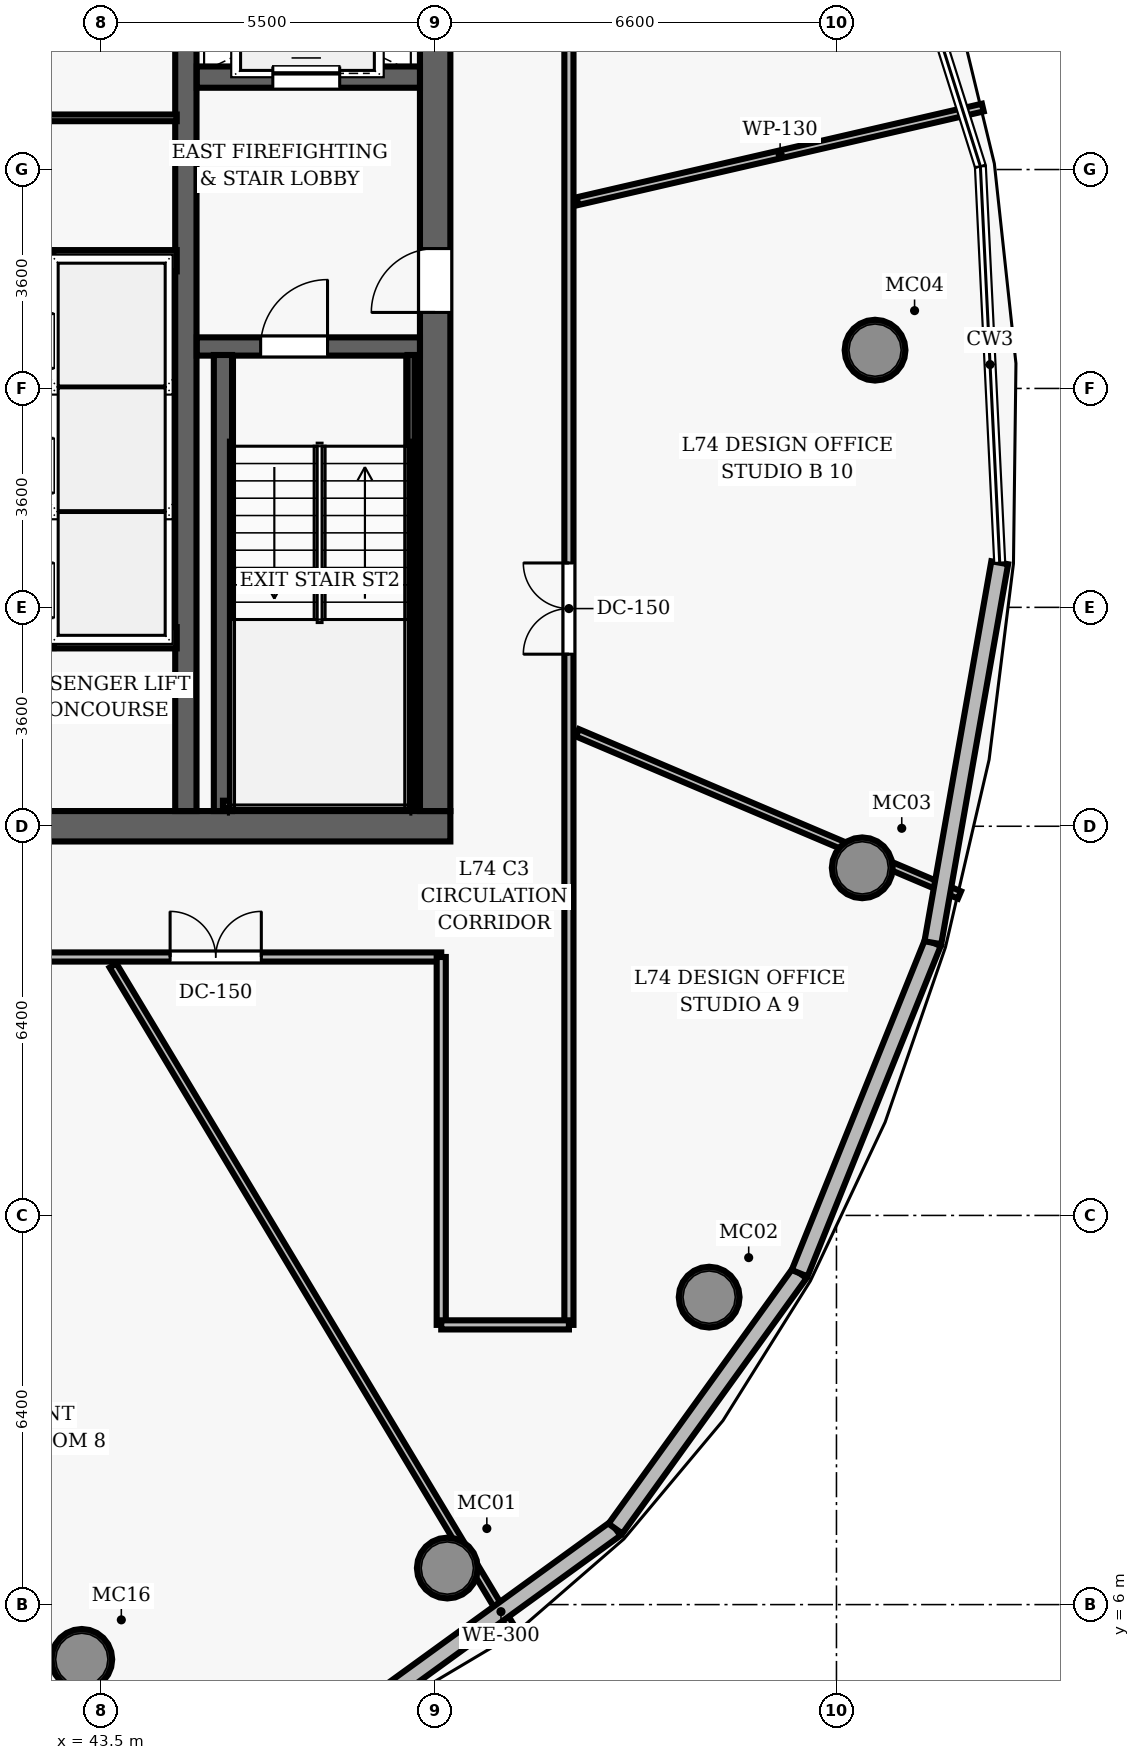
"""IFC4 building model, lengths in metres.
Left out: names, types, materials, properties, quantities, classifications, styles, units other than length and angle.
Written with IfcOpenShell. Run it as: python <this file> out.ifc"""

import sys

from ifc_helpers import new_model, si_unit, direction, frame, frame_2d, origin, origin_2d, place, context, subcontext, project, spatial, rectangle, hollow_circle, extrude, element, fill, save


model = new_model("IFC4")
c1 = context("Model", 3, precision=1e-05, world=origin(), true_north=direction((0.0, 1.0)))
c2 = subcontext(c1, "Body", "Model", "MODEL_VIEW")
j1 = project(units=[si_unit("LENGTHUNIT", "METRE"), si_unit("PLANEANGLEUNIT", "RADIAN")], contexts=[c1])
p1 = place(None, origin())
s1 = spatial("IfcSite", under=j1, at=p1, CompositionType="ELEMENT")
p2 = place(p1, origin())
s2 = spatial("IfcBuilding", under=s1, at=p2, CompositionType="ELEMENT")
p3 = place(p2, frame((0.0, 0.0, 292.1)))
s3 = spatial("IfcBuildingStorey", under=s2, at=p3, CompositionType="ELEMENT", Elevation=292.1)
p4 = place(p3, frame((26.75, 18.8, 0.0), z_axis=(0.0, 0.0, 1.0), x_axis=(1.0, 0.0, 0.0)))
e1 = element("IfcWall", 1, at=p4, inside=s3, PredefinedType="SHEAR", context=c2, shape_type="SweptSolid", body=[
    extrude(rectangle(XDim=22.5, YDim=0.5, at=frame_2d((11.25, 0.0))), origin(), (0.0, 0.0, 1.0), 3.85),
])
p5 = place(p4, frame((14.47, 0.0, 0.0)))
e2 = element("IfcOpeningElement", 2, at=p5, cuts=e1, PredefinedType="OPENING", context=c2, shape_type="SweptSolid", body=[
    extrude(rectangle(XDim=1.05, YDim=2.15, at=frame_2d((0.525, 1.075))), frame((0.0, 0.26, 0.0), z_axis=(0.0, -1.0, 0.0), x_axis=(1.0, 0.0, 0.0)), (0.0, 0.0, 1.0), 0.52),
])
p6 = place(p3, frame((49.0, 19.05, 0.0), z_axis=(0.0, 0.0, 1.0), x_axis=(0.0, 1.0, 0.0)))
e3 = element("IfcWall", 3, at=p6, inside=s3, PredefinedType="SHEAR", context=c2, shape_type="SweptSolid", body=[
    extrude(rectangle(XDim=13.9, YDim=0.5, at=frame_2d((6.95, 0.0))), origin(), (0.0, 0.0, 1.0), 3.85),
])
p7 = place(p6, frame((8.2, 0.0, 0.0)))
e4 = element("IfcOpeningElement", 4, at=p7, cuts=e3, PredefinedType="OPENING", context=c2, shape_type="SweptSolid", body=[
    extrude(rectangle(XDim=1.05, YDim=2.15, at=frame_2d((0.525, 1.075))), frame((0.0, 0.26, 0.0), z_axis=(0.0, -1.0, 0.0), x_axis=(1.0, 0.0, 0.0)), (0.0, 0.0, 1.0), 0.52),
])
p8 = place(p3, frame((44.9, 19.05, 0.0), z_axis=(0.0, 0.0, 1.0), x_axis=(0.0, 1.0, 0.0)))
e5 = element("IfcWall", 5, at=p8, inside=s3, PredefinedType="SHEAR", context=c2, shape_type="SweptSolid", body=[
    extrude(rectangle(XDim=13.9, YDim=0.35, at=frame_2d((6.95, 0.0))), origin(), (0.0, 0.0, 1.0), 3.85),
])
for number, where, z_axis, x_axis in (
    (6, (49.2, 6.601, 0.0), (0.0, 0.0, 1.0), (1.0, 0.0, 0.0)),
    (7, (53.506, 11.056, 0.0), (0.0, 0.0, 1.0), (1.0, 0.0, 0.0)),
    (8, (56.024, 18.116, 0.0), (0.0, 0.0, 1.0), (1.0, 0.0, 0.0)),
    (9, (56.235, 26.629, 0.0), (0.0, 0.0, 1.0), (1.0, 0.0, 0.0)),
    (10, (43.188, 5.099, 0.0), (0.0, 0.0, 1.0), (1.0, 0.0, 0.0)),
):
    element("IfcColumn", number, at=place(p3, frame(where, z_axis=z_axis, x_axis=x_axis)), inside=s3, PredefinedType="COLUMN", context=c2, shape_type="SweptSolid", body=[
        extrude(hollow_circle(Radius=0.5, WallThickness=0.045, at=origin_2d()), origin(), (0.0, 0.0, 1.0), 3.85),
    ])
p9 = place(p3, frame((45.08, 26.69, 0.0), z_axis=(0.0, 0.0, 1.0), x_axis=(1.0, 0.0, 0.0)))
e11 = element("IfcWall", 11, at=p9, inside=s3, PredefinedType="SHEAR", context=c2, shape_type="SweptSolid", body=[
    extrude(rectangle(XDim=3.67, YDim=0.3, at=frame_2d((1.835, 0.0))), origin(), (0.0, 0.0, 1.0), 3.85),
])
p10 = place(p9, frame((1.05, 0.0, 0.0)))
e12 = element("IfcOpeningElement", 12, at=p10, cuts=e11, PredefinedType="OPENING", context=c2, shape_type="SweptSolid", body=[
    extrude(rectangle(XDim=1.1, YDim=2.15, at=frame_2d((0.55, 1.075))), frame((0.0, 0.16, 0.0), z_axis=(0.0, -1.0, 0.0), x_axis=(1.0, 0.0, 0.0)), (0.0, 0.0, 1.0), 0.32),
])
p11 = place(p3, frame((45.51, 19.05, 0.0), z_axis=(0.0, 0.0, 1.0), x_axis=(0.0, 1.0, 0.0)))
e13 = element("IfcWall", 13, at=p11, inside=s3, PredefinedType="SHEAR", context=c2, shape_type="SweptSolid", body=[
    extrude(rectangle(XDim=7.5, YDim=0.3, at=frame_2d((3.75, 0.0))), origin(), (0.0, 0.0, 1.0), 3.85),
])
p12 = place(p3, frame((48.605, 19.1, 0.0), z_axis=(0.0, 0.0, 1.0), x_axis=(0.0, 1.0, 0.0)))
e14 = element("IfcWall", 14, at=p12, inside=s3, PredefinedType="SHEAR", context=c2, shape_type="SweptSolid", body=[
    extrude(rectangle(XDim=7.45, YDim=0.12, at=frame_2d((3.725, 0.0))), origin(), (0.0, 0.0, 1.0), 3.85),
])
p13 = place(p3, frame((45.51, 19.16, 0.0), z_axis=(0.0, 0.0, 1.0), x_axis=(1.0, 0.0, 0.0)))
e15 = element("IfcWall", 15, at=p13, inside=s3, PredefinedType="SHEAR", context=c2, shape_type="SweptSolid", body=[
    extrude(rectangle(XDim=3.095, YDim=0.12, at=frame_2d((1.547, 0.0))), origin(), (0.0, 0.0, 1.0), 3.85),
])
p14 = place(p3, frame((45.08, 31.12, 0.0), z_axis=(0.0, 0.0, 1.0), x_axis=(1.0, 0.0, 0.0)))
e16 = element("IfcWall", 16, at=p14, inside=s3, PredefinedType="SHEAR", context=c2, shape_type="SweptSolid", body=[
    extrude(rectangle(XDim=3.67, YDim=0.35, at=frame_2d((1.835, 0.0))), origin(), (0.0, 0.0, 1.0), 3.04),
])
p15 = place(p14, frame((1.25, 0.0, 0.0)))
e17 = element("IfcOpeningElement", 17, at=p15, cuts=e16, PredefinedType="OPENING", context=c2, shape_type="SweptSolid", body=[
    extrude(rectangle(XDim=1.1, YDim=2.15, at=frame_2d((0.55, 1.075))), frame((0.0, 0.185, 0.0), z_axis=(0.0, -1.0, 0.0), x_axis=(1.0, 0.0, 0.0)), (0.0, 0.0, 1.0), 0.37),
])
p16 = place(p3, frame((42.55, 21.73, 0.0), z_axis=(0.0, 0.0, 1.0), x_axis=(0.0, 1.0, 0.0)))
e18 = element("IfcWall", 18, at=p16, inside=s3, PredefinedType="SHEAR", context=c2, shape_type="SweptSolid", body=[
    extrude(rectangle(XDim=6.54, YDim=0.35, at=frame_2d((3.27, 0.0))), origin(), (0.0, 0.0, 1.0), 3.04),
])
p17 = place(p16, frame((0.5, 0.0, 0.0)))
e19 = element("IfcOpeningElement", 19, at=p17, cuts=e18, PredefinedType="OPENING", context=c2, shape_type="SweptSolid", body=[
    extrude(rectangle(XDim=0.9, YDim=2.15, at=frame_2d((0.45, 1.075))), frame((0.0, 0.185, 0.0), z_axis=(0.0, -1.0, 0.0), x_axis=(1.0, 0.0, 0.0)), (0.0, 0.0, 1.0), 0.37),
])
p18 = place(p16, frame((2.55, 0.0, 0.0)))
e20 = element("IfcOpeningElement", 20, at=p18, cuts=e18, PredefinedType="OPENING", context=c2, shape_type="SweptSolid", body=[
    extrude(rectangle(XDim=0.9, YDim=2.15, at=frame_2d((0.45, 1.075))), frame((0.0, 0.185, 0.0), z_axis=(0.0, -1.0, 0.0), x_axis=(1.0, 0.0, 0.0)), (0.0, 0.0, 1.0), 0.37),
])
p19 = place(p16, frame((4.6, 0.0, 0.0)))
e21 = element("IfcOpeningElement", 21, at=p19, cuts=e18, PredefinedType="OPENING", context=c2, shape_type="SweptSolid", body=[
    extrude(rectangle(XDim=0.9, YDim=2.15, at=frame_2d((0.45, 1.075))), frame((0.0, 0.185, 0.0), z_axis=(0.0, -1.0, 0.0), x_axis=(1.0, 0.0, 0.0)), (0.0, 0.0, 1.0), 0.37),
])
for number, where, z_axis, x_axis in (
    (22, (42.72, 21.9, 0.0), (0.0, 0.0, 1.0), (1.0, 0.0, 0.0)),
    (23, (42.72, 28.1, 0.0), (0.0, 0.0, 1.0), (1.0, 0.0, 0.0)),
):
    element("IfcWall", number, at=place(p3, frame(where, z_axis=z_axis, x_axis=x_axis)), inside=s3, PredefinedType="SHEAR", context=c2, shape_type="SweptSolid", body=[
        extrude(rectangle(XDim=2.03, YDim=0.35, at=frame_2d((1.015, 0.0))), origin(), (0.0, 0.0, 1.0), 3.04),
    ])
p20 = place(p3, frame((42.55, 30.45, 0.0), z_axis=(0.0, 0.0, 1.0), x_axis=(1.0, 0.0, 0.0)))
e24 = element("IfcWall", 24, at=p20, inside=s3, PredefinedType="PARTITIONING", context=c2, shape_type="SweptSolid", body=[
    extrude(rectangle(XDim=2.2, YDim=0.11, at=frame_2d((1.1, 0.0))), origin(), (0.0, 0.0, 1.0), 3.04),
])
p21 = place(p3, frame((26.9, 16.65, 0.0), z_axis=(0.0, 0.0, 1.0), x_axis=(1.0, 0.0, 0.0)))
e25 = element("IfcWall", 25, at=p21, inside=s3, PredefinedType="PARTITIONING", context=c2, shape_type="SweptSolid", body=[
    extrude(rectangle(XDim=22.2, YDim=0.15, at=frame_2d((11.1, 0.0))), origin(), (0.0, 0.0, 1.0), 3.04),
])
p22 = place(p21, frame((7.813, 0.0, 0.0)))
e26 = element("IfcOpeningElement", 26, at=p22, cuts=e25, PredefinedType="OPENING", context=c2, shape_type="SweptSolid", body=[
    extrude(rectangle(XDim=1.5, YDim=2.2, at=frame_2d((0.75, 1.1))), frame((0.0, 0.085, 0.0), z_axis=(0.0, -1.0, 0.0), x_axis=(1.0, 0.0, 0.0)), (0.0, 0.0, 1.0), 0.17),
])
p23 = place(p21, frame((14.125, 0.0, 0.0)))
e27 = element("IfcOpeningElement", 27, at=p23, cuts=e25, PredefinedType="OPENING", context=c2, shape_type="SweptSolid", body=[
    extrude(rectangle(XDim=0.95, YDim=2.15, at=frame_2d((0.475, 1.075))), frame((0.0, 0.085, 0.0), z_axis=(0.0, -1.0, 0.0), x_axis=(1.0, 0.0, 0.0)), (0.0, 0.0, 1.0), 0.17),
])
p24 = place(p21, frame((17.741, 0.0, 0.0)))
e28 = element("IfcOpeningElement", 28, at=p24, cuts=e25, PredefinedType="OPENING", context=c2, shape_type="SweptSolid", body=[
    extrude(rectangle(XDim=1.5, YDim=2.2, at=frame_2d((0.75, 1.1))), frame((0.0, 0.085, 0.0), z_axis=(0.0, -1.0, 0.0), x_axis=(1.0, 0.0, 0.0)), (0.0, 0.0, 1.0), 0.17),
])
p25 = place(p3, frame((51.2, 10.6, 0.0), z_axis=(0.0, 0.0, 1.0), x_axis=(0.0, 1.0, 0.0)))
e29 = element("IfcWall", 29, at=p25, inside=s3, PredefinedType="PARTITIONING", context=c2, shape_type="SweptSolid", body=[
    extrude(rectangle(XDim=30.8, YDim=0.15, at=frame_2d((15.4, 0.0))), origin(), (0.0, 0.0, 1.0), 3.04),
])
p26 = place(p25, frame((26.895, 0.0, 0.0)))
e30 = element("IfcOpeningElement", 30, at=p26, cuts=e29, PredefinedType="OPENING", context=c2, shape_type="SweptSolid", body=[
    extrude(rectangle(XDim=1.5, YDim=2.2, at=frame_2d((0.75, 1.1))), frame((0.0, 0.085, 0.0), z_axis=(0.0, -1.0, 0.0), x_axis=(1.0, 0.0, 0.0)), (0.0, 0.0, 1.0), 0.17),
])
p27 = place(p25, frame((11.03, 0.0, 0.0)))
e31 = element("IfcOpeningElement", 31, at=p27, cuts=e29, PredefinedType="OPENING", context=c2, shape_type="SweptSolid", body=[
    extrude(rectangle(XDim=1.5, YDim=2.2, at=frame_2d((0.75, 1.1))), frame((0.0, 0.085, 0.0), z_axis=(0.0, -1.0, 0.0), x_axis=(1.0, 0.0, 0.0)), (0.0, 0.0, 1.0), 0.17),
])
p28 = place(p3, frame((49.1, 10.6, 0.0), z_axis=(0.0, 0.0, 1.0), x_axis=(0.0, 1.0, 0.0)))
e32 = element("IfcWall", 32, at=p28, inside=s3, PredefinedType="PARTITIONING", context=c2, shape_type="SweptSolid", body=[
    extrude(rectangle(XDim=6.05, YDim=0.15, at=frame_2d((3.025, 0.0))), origin(), (0.0, 0.0, 1.0), 3.04),
])
p29 = place(p3, frame((49.1, 10.6, 0.0), z_axis=(0.0, 0.0, 1.0), x_axis=(1.0, 0.0, 0.0)))
e33 = element("IfcWall", 33, at=p29, inside=s3, PredefinedType="PARTITIONING", context=c2, shape_type="SweptSolid", body=[
    extrude(rectangle(XDim=2.1, YDim=0.15, at=frame_2d((1.05, 0.0))), origin(), (0.0, 0.0, 1.0), 3.04),
])
p30 = place(p3, frame((51.34, 29.08, 0.0), z_axis=(0.0, 0.0, 1.0), x_axis=(0.974374354779, 0.22493247153, 0.0)))
e34 = element("IfcWall", 34, at=p30, inside=s3, PredefinedType="PARTITIONING", context=c2, shape_type="SweptSolid", body=[
    extrude(rectangle(XDim=6.842, YDim=0.13, at=frame_2d((3.421, 0.0))), origin(), (0.0, 0.0, 1.0), 3.04),
])
p31 = place(p3, frame((43.702, 16.51, 0.0), z_axis=(0.0, 0.0, 1.0), x_axis=(0.515037616381, -0.857167576214, 0.0)))
e35 = element("IfcWall", 35, at=p31, inside=s3, PredefinedType="PARTITIONING", context=c2, shape_type="SweptSolid", body=[
    extrude(rectangle(XDim=12.852, YDim=0.13, at=frame_2d((6.426, 0.0))), origin(), (0.0, 0.0, 1.0), 3.04),
])
p32 = place(p3, frame((51.34, 20.337, 0.0), z_axis=(0.0, 0.0, 1.0), x_axis=(0.92050850524, -0.390722525305, 0.0)))
e36 = element("IfcWall", 36, at=p32, inside=s3, PredefinedType="PARTITIONING", context=c2, shape_type="SweptSolid", body=[
    extrude(rectangle(XDim=6.826, YDim=0.13, at=frame_2d((3.413, 0.0))), origin(), (0.0, 0.0, 1.0), 3.04),
])
p33 = place(p3, frame((51.965, 7.249, 0.0), z_axis=(0.0, 0.0, 1.0), x_axis=(-0.809566158973, -0.587028648573, 0.0)))
e37 = element("IfcWall", 37, at=p33, inside=s3, PredefinedType="SOLIDWALL", context=c2, shape_type="SweptSolid", body=[
    extrude(rectangle(XDim=4.65, YDim=0.28, at=frame_2d((2.325, 0.0))), origin(), (0.0, 0.0, 1.0), 3.625),
])
p34 = place(p3, frame((54.994, 11.45, 0.0), z_axis=(0.0, 0.0, 1.0), x_axis=(-0.584893181171, -0.811110329498, 0.0)))
e38 = element("IfcWall", 38, at=p34, inside=s3, PredefinedType="SOLIDWALL", context=c2, shape_type="SweptSolid", body=[
    extrude(rectangle(XDim=5.179, YDim=0.28, at=frame_2d((2.59, 0.0))), origin(), (0.0, 0.0, 1.0), 3.625),
])
p35 = place(p3, frame((57.185, 16.885, 0.0), z_axis=(0.0, 0.0, 1.0), x_axis=(-0.373889146258, -0.927473399247, 0.0)))
e39 = element("IfcWall", 39, at=p35, inside=s3, PredefinedType="SOLIDWALL", context=c2, shape_type="SweptSolid", body=[
    extrude(rectangle(XDim=5.86, YDim=0.28, at=frame_2d((2.93, 0.0))), origin(), (0.0, 0.0, 1.0), 3.625),
])
p36 = place(p3, frame((58.285, 23.134, 0.0), z_axis=(0.0, 0.0, 1.0), x_axis=(-0.17329584109, -0.984869814473, 0.0)))
e40 = element("IfcWall", 40, at=p36, inside=s3, PredefinedType="SOLIDWALL", context=c2, shape_type="SweptSolid", body=[
    extrude(rectangle(XDim=6.345, YDim=0.28, at=frame_2d((3.173, 0.0))), origin(), (0.0, 0.0, 1.0), 3.625),
])
p37 = place(p10, origin())
e41 = element("IfcDoor", 41, at=p37, inside=s3, OperationType="SINGLE_SWING_RIGHT", PredefinedType="DOOR", context=c2, shape_type="SweptSolid", body=[
    extrude(rectangle(XDim=1.1, YDim=2.15, at=frame_2d((0.55, 1.075))), frame((0.0, 0.025, 0.0), z_axis=(0.0, -1.0, 0.0), x_axis=(1.0, 0.0, 0.0)), (0.0, 0.0, 1.0), 0.05),
])
fill(e12, e41)
p38 = place(p7, origin())
e42 = element("IfcDoor", 42, at=p38, inside=s3, OperationType="SINGLE_SWING_LEFT", PredefinedType="DOOR", context=c2, shape_type="SweptSolid", body=[
    extrude(rectangle(XDim=1.05, YDim=2.15, at=frame_2d((0.525, 1.075))), frame((0.0, 0.025, 0.0), z_axis=(0.0, -1.0, 0.0), x_axis=(1.0, 0.0, 0.0)), (0.0, 0.0, 1.0), 0.05),
])
fill(e4, e42)
p39 = place(p24, origin())
e43 = element("IfcDoor", 43, at=p39, inside=s3, OperationType="DOUBLE_DOOR_SINGLE_SWING", PredefinedType="DOOR", context=c2, shape_type="SweptSolid", body=[
    extrude(rectangle(XDim=1.5, YDim=2.2, at=frame_2d((0.75, 1.1))), frame((0.0, 0.025, 0.0), z_axis=(0.0, -1.0, 0.0), x_axis=(1.0, 0.0, 0.0)), (0.0, 0.0, 1.0), 0.05),
])
fill(e28, e43)
p40 = place(p27, origin())
e44 = element("IfcDoor", 44, at=p40, inside=s3, OperationType="DOUBLE_DOOR_SINGLE_SWING", PredefinedType="DOOR", context=c2, shape_type="SweptSolid", body=[
    extrude(rectangle(XDim=1.5, YDim=2.2, at=frame_2d((0.75, 1.1))), frame((0.0, 0.025, 0.0), z_axis=(0.0, -1.0, 0.0), x_axis=(1.0, 0.0, 0.0)), (0.0, 0.0, 1.0), 0.05),
])
fill(e31, e44)
p41 = place(p15, origin())
e45 = element("IfcDoor", 45, at=p41, inside=s3, OperationType="SLIDING_TO_LEFT", PredefinedType="DOOR", context=c2, shape_type="SweptSolid", body=[
    extrude(rectangle(XDim=1.1, YDim=2.15, at=frame_2d((0.55, 1.075))), frame((0.0, 0.025, 0.0), z_axis=(0.0, -1.0, 0.0), x_axis=(1.0, 0.0, 0.0)), (0.0, 0.0, 1.0), 0.05),
])
fill(e17, e45)
save(model, sys.argv[1])
